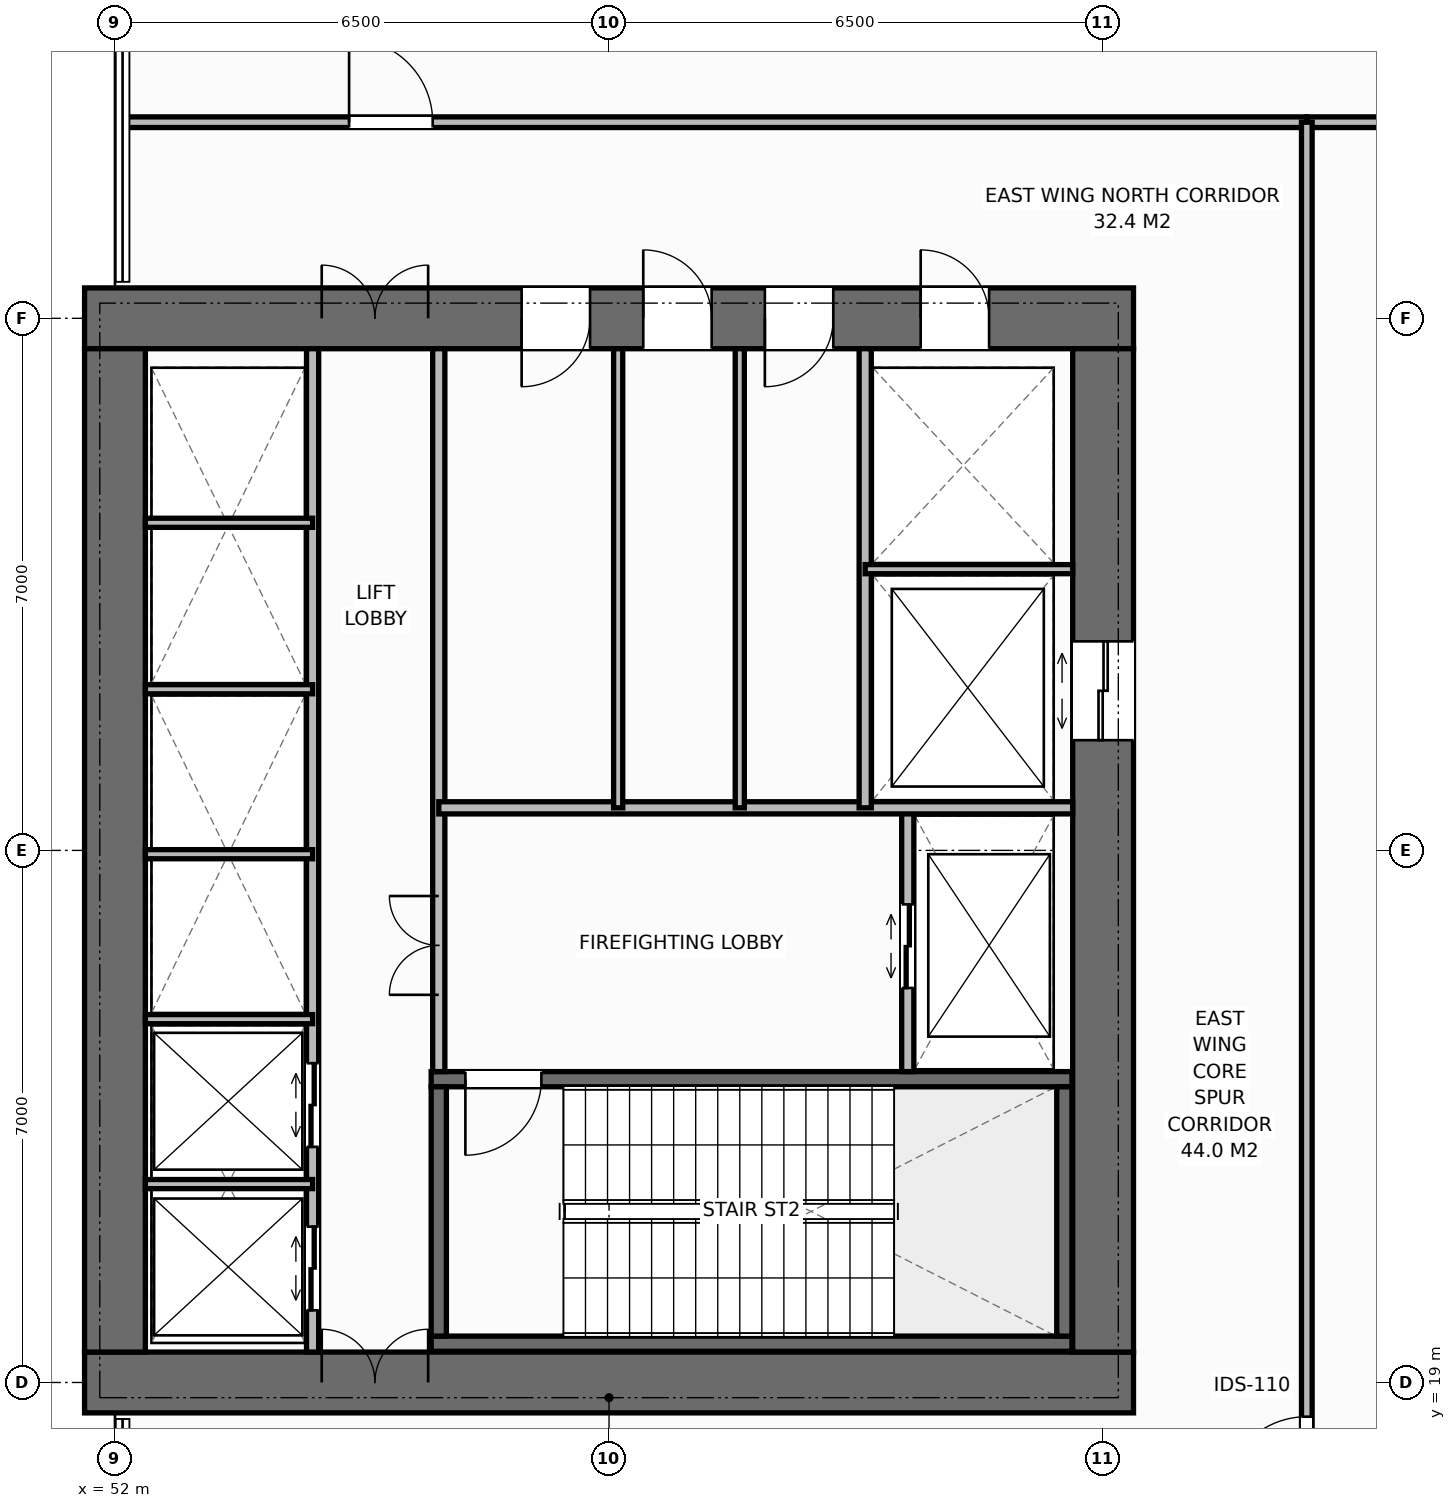
"""IFC4 building model, lengths in metres.
Left out: names, types, materials, properties, quantities, classifications, styles, units other than length and angle.
Written with IfcOpenShell. Run it as: python <this file> out.ifc"""

import sys

from ifc_helpers import new_model, si_unit, direction, frame, frame_2d, origin, place, context, subcontext, project, spatial, rectangle, extrude, element, fill, save


model = new_model("IFC4")
c1 = context("Model", 3, precision=1e-05, world=origin(), true_north=direction((0.0, 1.0)))
c2 = subcontext(c1, "Body", "Model", "MODEL_VIEW")
j1 = project(units=[si_unit("LENGTHUNIT", "METRE"), si_unit("PLANEANGLEUNIT", "RADIAN")], contexts=[c1])
p1 = place(None, origin())
s1 = spatial("IfcSite", under=j1, at=p1, CompositionType="ELEMENT")
p2 = place(p1, origin())
s2 = spatial("IfcBuilding", under=s1, at=p2, CompositionType="ELEMENT")
p3 = place(p2, frame((0.0, 0.0, 11.5)))
s3 = spatial("IfcBuildingStorey", under=s2, at=p3, CompositionType="ELEMENT", Elevation=11.5)
p4 = place(p3, frame((51.6, 19.0, 0.0), z_axis=(0.0, 0.0, 1.0), x_axis=(1.0, 0.0, 0.0)))
e1 = element("IfcWall", 1, at=p4, inside=s3, PredefinedType="SHEAR", context=c2, shape_type="SweptSolid", body=[
    extrude(rectangle(XDim=13.8, YDim=0.8, at=frame_2d((6.9, 0.0))), origin(), (0.0, 0.0, 1.0), 5.5),
])
p5 = place(p4, frame((3.12, 0.0, 0.0)))
e2 = element("IfcOpeningElement", 2, at=p5, cuts=e1, PredefinedType="OPENING", context=c2, shape_type="SweptSolid", body=[
    extrude(rectangle(XDim=1.4, YDim=2.2, at=frame_2d((0.7, 1.1))), frame((0.0, 0.41, 0.0), z_axis=(0.0, -1.0, 0.0), x_axis=(1.0, 0.0, 0.0)), (0.0, 0.0, 1.0), 0.82),
])
p6 = place(p3, frame((51.6, 33.0, 0.0), z_axis=(0.0, 0.0, 1.0), x_axis=(1.0, 0.0, 0.0)))
e3 = element("IfcWall", 3, at=p6, inside=s3, PredefinedType="SHEAR", context=c2, shape_type="SweptSolid", body=[
    extrude(rectangle(XDim=13.8, YDim=0.8, at=frame_2d((6.9, 0.0))), origin(), (0.0, 0.0, 1.0), 5.5),
])
p7 = place(p6, frame((3.12, 0.0, 0.0)))
e4 = element("IfcOpeningElement", 4, at=p7, cuts=e3, PredefinedType="OPENING", context=c2, shape_type="SweptSolid", body=[
    extrude(rectangle(XDim=1.4, YDim=2.2, at=frame_2d((0.7, 1.1))), frame((0.0, 0.41, 0.0), z_axis=(0.0, -1.0, 0.0), x_axis=(1.0, 0.0, 0.0)), (0.0, 0.0, 1.0), 0.82),
])
p8 = place(p6, frame((11.0, 0.0, 0.0)))
e5 = element("IfcOpeningElement", 5, at=p8, cuts=e3, PredefinedType="OPENING", context=c2, shape_type="SweptSolid", body=[
    extrude(rectangle(XDim=0.9, YDim=2.15, at=frame_2d((0.45, 1.075))), frame((0.0, 0.41, 0.0), z_axis=(0.0, -1.0, 0.0), x_axis=(1.0, 0.0, 0.0)), (0.0, 0.0, 1.0), 0.82),
])
p9 = place(p6, frame((5.75, 0.0, 0.0)))
e6 = element("IfcOpeningElement", 6, at=p9, cuts=e3, PredefinedType="OPENING", context=c2, shape_type="SweptSolid", body=[
    extrude(rectangle(XDim=0.9, YDim=2.15, at=frame_2d((0.45, 1.075))), frame((0.0, 0.41, 0.0), z_axis=(0.0, -1.0, 0.0), x_axis=(1.0, 0.0, 0.0)), (0.0, 0.0, 1.0), 0.82),
])
p10 = place(p6, frame((7.35, 0.0, 0.0)))
e7 = element("IfcOpeningElement", 7, at=p10, cuts=e3, PredefinedType="OPENING", context=c2, shape_type="SweptSolid", body=[
    extrude(rectangle(XDim=0.9, YDim=2.15, at=frame_2d((0.45, 1.075))), frame((0.0, 0.41, 0.0), z_axis=(0.0, -1.0, 0.0), x_axis=(1.0, 0.0, 0.0)), (0.0, 0.0, 1.0), 0.82),
])
p11 = place(p6, frame((8.95, 0.0, 0.0)))
e8 = element("IfcOpeningElement", 8, at=p11, cuts=e3, PredefinedType="OPENING", context=c2, shape_type="SweptSolid", body=[
    extrude(rectangle(XDim=0.9, YDim=2.15, at=frame_2d((0.45, 1.075))), frame((0.0, 0.41, 0.0), z_axis=(0.0, -1.0, 0.0), x_axis=(1.0, 0.0, 0.0)), (0.0, 0.0, 1.0), 0.82),
])
p12 = place(p3, frame((52.0, 19.4, 0.0), z_axis=(0.0, 0.0, 1.0), x_axis=(0.0, 1.0, 0.0)))
e9 = element("IfcWall", 9, at=p12, inside=s3, PredefinedType="SHEAR", context=c2, shape_type="SweptSolid", body=[
    extrude(rectangle(XDim=13.2, YDim=0.8, at=frame_2d((6.6, 0.0))), origin(), (0.0, 0.0, 1.0), 5.5),
])
p13 = place(p3, frame((65.0, 19.4, 0.0), z_axis=(0.0, 0.0, 1.0), x_axis=(0.0, 1.0, 0.0)))
e10 = element("IfcWall", 10, at=p13, inside=s3, PredefinedType="SHEAR", context=c2, shape_type="SweptSolid", body=[
    extrude(rectangle(XDim=13.2, YDim=0.8, at=frame_2d((6.6, 0.0))), origin(), (0.0, 0.0, 1.0), 5.5),
])
p14 = place(p13, frame((8.05, 0.0, 0.0)))
e11 = element("IfcOpeningElement", 11, at=p14, cuts=e10, PredefinedType="OPENING", context=c2, shape_type="SweptSolid", body=[
    extrude(rectangle(XDim=1.3, YDim=2.2, at=frame_2d((0.65, 1.1))), frame((0.0, 0.41, 0.0), z_axis=(0.0, -1.0, 0.0), x_axis=(1.0, 0.0, 0.0)), (0.0, 0.0, 1.0), 0.82),
])
p15 = place(p3, frame((56.16, 19.51, 0.0), z_axis=(0.0, 0.0, 1.0), x_axis=(1.0, 0.0, 0.0)))
e12 = element("IfcWall", 12, at=p15, inside=s3, PredefinedType="SHEAR", context=c2, shape_type="SweptSolid", body=[
    extrude(rectangle(XDim=8.43, YDim=0.2, at=frame_2d((4.215, 0.0))), origin(), (0.0, 0.0, 1.0), 5.5),
])
p16 = place(p3, frame((56.16, 22.99, 0.0), z_axis=(0.0, 0.0, 1.0), x_axis=(1.0, 0.0, 0.0)))
e13 = element("IfcWall", 13, at=p16, inside=s3, PredefinedType="SHEAR", context=c2, shape_type="SweptSolid", body=[
    extrude(rectangle(XDim=8.43, YDim=0.2, at=frame_2d((4.215, 0.0))), origin(), (0.0, 0.0, 1.0), 5.5),
])
p17 = place(p16, frame((0.45, 0.0, 0.0)))
e14 = element("IfcOpeningElement", 14, at=p17, cuts=e13, PredefinedType="OPENING", context=c2, shape_type="SweptSolid", body=[
    extrude(rectangle(XDim=1.0, YDim=2.15, at=frame_2d((0.5, 1.075))), frame((0.0, 0.11, 0.0), z_axis=(0.0, -1.0, 0.0), x_axis=(1.0, 0.0, 0.0)), (0.0, 0.0, 1.0), 0.22),
])
for number, where, z_axis, x_axis in (
    (15, (56.26, 19.61, 0.0), (0.0, 0.0, 1.0), (0.0, 1.0, 0.0)),
    (16, (64.49, 19.61, 0.0), (0.0, 0.0, 1.0), (0.0, 1.0, 0.0)),
):
    element("IfcWall", number, at=place(p3, frame(where, z_axis=z_axis, x_axis=x_axis)), inside=s3, PredefinedType="SHEAR", context=c2, shape_type="SweptSolid", body=[
        extrude(rectangle(XDim=3.28, YDim=0.2, at=frame_2d((1.64, 0.0))), origin(), (0.0, 0.0, 1.0), 5.5),
    ])
p18 = place(p3, frame((54.6, 19.4, 0.0), z_axis=(0.0, 0.0, 1.0), x_axis=(0.0, 1.0, 0.0)))
e17 = element("IfcWall", 17, at=p18, inside=s3, PredefinedType="STANDARD", context=c2, shape_type="SweptSolid", body=[
    extrude(rectangle(XDim=13.2, YDim=0.16, at=frame_2d((6.6, 0.0))), origin(), (0.0, 0.0, 1.0), 5.22),
])
p19 = place(p18, frame((0.55, 0.0, 0.0)))
e18 = element("IfcOpeningElement", 18, at=p19, cuts=e17, PredefinedType="OPENING", context=c2, shape_type="SweptSolid", body=[
    extrude(rectangle(XDim=1.1, YDim=2.2, at=frame_2d((0.55, 1.1))), frame((0.0, 0.09, 0.0), z_axis=(0.0, -1.0, 0.0), x_axis=(1.0, 0.0, 0.0)), (0.0, 0.0, 1.0), 0.18),
])
p20 = place(p18, frame((2.7, 0.0, 0.0)))
e19 = element("IfcOpeningElement", 19, at=p20, cuts=e17, PredefinedType="OPENING", context=c2, shape_type="SweptSolid", body=[
    extrude(rectangle(XDim=1.1, YDim=2.2, at=frame_2d((0.55, 1.1))), frame((0.0, 0.09, 0.0), z_axis=(0.0, -1.0, 0.0), x_axis=(1.0, 0.0, 0.0)), (0.0, 0.0, 1.0), 0.18),
])
p21 = place(p3, frame((56.26, 23.09, 0.0), z_axis=(0.0, 0.0, 1.0), x_axis=(0.0, 1.0, 0.0)))
e20 = element("IfcWall", 20, at=p21, inside=s3, PredefinedType="STANDARD", context=c2, shape_type="SweptSolid", body=[
    extrude(rectangle(XDim=9.51, YDim=0.16, at=frame_2d((4.755, 0.0))), origin(), (0.0, 0.0, 1.0), 5.22),
])
p22 = place(p21, frame((1.01, 0.0, 0.0)))
e21 = element("IfcOpeningElement", 21, at=p22, cuts=e20, PredefinedType="OPENING", context=c2, shape_type="SweptSolid", body=[
    extrude(rectangle(XDim=1.3, YDim=2.2, at=frame_2d((0.65, 1.1))), frame((0.0, 0.09, 0.0), z_axis=(0.0, -1.0, 0.0), x_axis=(1.0, 0.0, 0.0)), (0.0, 0.0, 1.0), 0.18),
])
for number, where, z_axis, x_axis in (
    (22, (52.4, 21.61, 0.0), (0.0, 0.0, 1.0), (1.0, 0.0, 0.0)),
    (23, (52.4, 23.78, 0.0), (0.0, 0.0, 1.0), (1.0, 0.0, 0.0)),
    (24, (52.4, 25.95, 0.0), (0.0, 0.0, 1.0), (1.0, 0.0, 0.0)),
    (25, (52.4, 28.12, 0.0), (0.0, 0.0, 1.0), (1.0, 0.0, 0.0)),
    (26, (52.4, 30.31, 0.0), (0.0, 0.0, 1.0), (1.0, 0.0, 0.0)),
):
    element("IfcWall", number, at=place(p3, frame(where, z_axis=z_axis, x_axis=x_axis)), inside=s3, PredefinedType="PARTITIONING", context=c2, shape_type="SweptSolid", body=[
        extrude(rectangle(XDim=2.2, YDim=0.12, at=frame_2d((1.1, 0.0))), origin(), (0.0, 0.0, 1.0), 5.22),
    ])
p23 = place(p3, frame((62.43, 23.09, 0.0), z_axis=(0.0, 0.0, 1.0), x_axis=(0.0, 1.0, 0.0)))
e27 = element("IfcWall", 27, at=p23, inside=s3, PredefinedType="STANDARD", context=c2, shape_type="SweptSolid", body=[
    extrude(rectangle(XDim=3.47, YDim=0.16, at=frame_2d((1.735, 0.0))), origin(), (0.0, 0.0, 1.0), 5.22),
])
p24 = place(p23, frame((1.1, 0.0, 0.0)))
e28 = element("IfcOpeningElement", 28, at=p24, cuts=e27, PredefinedType="OPENING", context=c2, shape_type="SweptSolid", body=[
    extrude(rectangle(XDim=1.1, YDim=2.2, at=frame_2d((0.55, 1.1))), frame((0.0, 0.09, 0.0), z_axis=(0.0, -1.0, 0.0), x_axis=(1.0, 0.0, 0.0)), (0.0, 0.0, 1.0), 0.18),
])
p25 = place(p3, frame((56.26, 26.56, 0.0), z_axis=(0.0, 0.0, 1.0), x_axis=(1.0, 0.0, 0.0)))
e29 = element("IfcWall", 29, at=p25, inside=s3, PredefinedType="STANDARD", context=c2, shape_type="SweptSolid", body=[
    extrude(rectangle(XDim=8.34, YDim=0.16, at=frame_2d((4.17, 0.0))), origin(), (0.0, 0.0, 1.0), 5.22),
])
p26 = place(p3, frame((61.87, 26.56, 0.0), z_axis=(0.0, 0.0, 1.0), x_axis=(0.0, 1.0, 0.0)))
e30 = element("IfcWall", 30, at=p26, inside=s3, PredefinedType="STANDARD", context=c2, shape_type="SweptSolid", body=[
    extrude(rectangle(XDim=6.04, YDim=0.16, at=frame_2d((3.02, 0.0))), origin(), (0.0, 0.0, 1.0), 5.22),
])
p27 = place(p3, frame((61.87, 29.7, 0.0), z_axis=(0.0, 0.0, 1.0), x_axis=(1.0, 0.0, 0.0)))
e31 = element("IfcWall", 31, at=p27, inside=s3, PredefinedType="PARTITIONING", context=c2, shape_type="SweptSolid", body=[
    extrude(rectangle(XDim=2.73, YDim=0.12, at=frame_2d((1.365, 0.0))), origin(), (0.0, 0.0, 1.0), 5.22),
])
for number, where, z_axis, x_axis in (
    (32, (58.62, 26.56, 0.0), (0.0, 0.0, 1.0), (0.0, 1.0, 0.0)),
    (33, (60.22, 26.56, 0.0), (0.0, 0.0, 1.0), (0.0, 1.0, 0.0)),
):
    element("IfcWall", number, at=place(p3, frame(where, z_axis=z_axis, x_axis=x_axis)), inside=s3, PredefinedType="PARTITIONING", context=c2, shape_type="SweptSolid", body=[
        extrude(rectangle(XDim=6.04, YDim=0.12, at=frame_2d((3.02, 0.0))), origin(), (0.0, 0.0, 1.0), 5.22),
    ])
p28 = place(p3, frame((67.68, 35.58, 0.0), z_axis=(0.0, 0.0, 1.0), x_axis=(1.0, 0.0, 0.0)))
e34 = element("IfcWall", 34, at=p28, inside=s3, PredefinedType="PARTITIONING", context=c2, shape_type="SweptSolid", body=[
    extrude(rectangle(XDim=10.32, YDim=0.14, at=frame_2d((5.16, 0.0))), origin(), (0.0, 0.0, 1.0), 5.22),
])
p29 = place(p3, frame((52.08, 35.58, 0.0), z_axis=(0.0, 0.0, 1.0), x_axis=(1.0, 0.0, 0.0)))
e35 = element("IfcWall", 35, at=p29, inside=s3, PredefinedType="PARTITIONING", context=c2, shape_type="SweptSolid", body=[
    extrude(rectangle(XDim=15.6, YDim=0.14, at=frame_2d((7.8, 0.0))), origin(), (0.0, 0.0, 1.0), 5.22),
])
p30 = place(p29, frame((3.0, 0.0, 0.0)))
e36 = element("IfcOpeningElement", 36, at=p30, cuts=e35, PredefinedType="OPENING", context=c2, shape_type="SweptSolid", body=[
    extrude(rectangle(XDim=1.1, YDim=2.15, at=frame_2d((0.55, 1.075))), frame((0.0, 0.08, 0.0), z_axis=(0.0, -1.0, 0.0), x_axis=(1.0, 0.0, 0.0)), (0.0, 0.0, 1.0), 0.16),
])
p31 = place(p3, frame((67.68, 12.45, 0.0), z_axis=(0.0, 0.0, 1.0), x_axis=(0.0, 1.0, 0.0)))
e37 = element("IfcWall", 37, at=p31, inside=s3, PredefinedType="PARTITIONING", context=c2, shape_type="SweptSolid", body=[
    extrude(rectangle(XDim=23.13, YDim=0.14, at=frame_2d((11.565, 0.0))), origin(), (0.0, 0.0, 1.0), 5.22),
])
p32 = place(p31, frame((5.0, 0.0, 0.0)))
e38 = element("IfcOpeningElement", 38, at=p32, cuts=e37, PredefinedType="OPENING", context=c2, shape_type="SweptSolid", body=[
    extrude(rectangle(XDim=1.1, YDim=2.15, at=frame_2d((0.55, 1.075))), frame((0.0, 0.08, 0.0), z_axis=(0.0, -1.0, 0.0), x_axis=(1.0, 0.0, 0.0)), (0.0, 0.0, 1.0), 0.16),
])
p33 = place(p5, origin())
e39 = element("IfcDoor", 39, at=p33, inside=s3, OperationType="DOUBLE_DOOR_SINGLE_SWING", PredefinedType="DOOR", context=c2, shape_type="SweptSolid", body=[
    extrude(rectangle(XDim=1.4, YDim=2.2, at=frame_2d((0.7, 1.1))), frame((0.0, 0.125, 0.0), z_axis=(0.0, -1.0, 0.0), x_axis=(1.0, 0.0, 0.0)), (0.0, 0.0, 1.0), 0.05),
])
fill(e2, e39)
p34 = place(p7, origin())
e40 = element("IfcDoor", 40, at=p34, inside=s3, OperationType="DOUBLE_DOOR_SINGLE_SWING", PredefinedType="DOOR", context=c2, shape_type="SweptSolid", body=[
    extrude(rectangle(XDim=1.4, YDim=2.2, at=frame_2d((0.7, 1.1))), frame((0.0, -0.075, 0.0), z_axis=(0.0, -1.0, 0.0), x_axis=(1.0, 0.0, 0.0)), (0.0, 0.0, 1.0), 0.05),
])
fill(e4, e40)
p35 = place(p19, origin())
e41 = element("IfcDoor", 41, at=p35, inside=s3, OperationType="DOUBLE_DOOR_SLIDING", PredefinedType="DOOR", context=c2, shape_type="SweptSolid", body=[
    extrude(rectangle(XDim=1.1, YDim=2.2, at=frame_2d((0.55, 1.1))), frame((0.0, 0.025, 0.0), z_axis=(0.0, -1.0, 0.0), x_axis=(1.0, 0.0, 0.0)), (0.0, 0.0, 1.0), 0.05),
])
fill(e18, e41)
p36 = place(p20, origin())
e42 = element("IfcDoor", 42, at=p36, inside=s3, OperationType="DOUBLE_DOOR_SLIDING", PredefinedType="DOOR", context=c2, shape_type="SweptSolid", body=[
    extrude(rectangle(XDim=1.1, YDim=2.2, at=frame_2d((0.55, 1.1))), frame((0.0, 0.025, 0.0), z_axis=(0.0, -1.0, 0.0), x_axis=(1.0, 0.0, 0.0)), (0.0, 0.0, 1.0), 0.05),
])
fill(e19, e42)
p37 = place(p17, origin())
e43 = element("IfcDoor", 43, at=p37, inside=s3, OperationType="SINGLE_SWING_RIGHT", PredefinedType="DOOR", context=c2, shape_type="SweptSolid", body=[
    extrude(rectangle(XDim=1.0, YDim=2.15, at=frame_2d((0.5, 1.075))), frame((0.0, 0.025, 0.0), z_axis=(0.0, -1.0, 0.0), x_axis=(1.0, 0.0, 0.0)), (0.0, 0.0, 1.0), 0.05),
])
fill(e14, e43)
p38 = place(p24, origin())
e44 = element("IfcDoor", 44, at=p38, inside=s3, OperationType="DOUBLE_DOOR_SLIDING", PredefinedType="DOOR", context=c2, shape_type="SweptSolid", body=[
    extrude(rectangle(XDim=1.1, YDim=2.2, at=frame_2d((0.55, 1.1))), frame((0.0, 0.025, 0.0), z_axis=(0.0, -1.0, 0.0), x_axis=(1.0, 0.0, 0.0)), (0.0, 0.0, 1.0), 0.05),
])
fill(e28, e44)
p39 = place(p22, origin())
e45 = element("IfcDoor", 45, at=p39, inside=s3, OperationType="DOUBLE_DOOR_SINGLE_SWING", PredefinedType="DOOR", context=c2, shape_type="SweptSolid", body=[
    extrude(rectangle(XDim=1.3, YDim=2.2, at=frame_2d((0.65, 1.1))), frame((0.0, 0.025, 0.0), z_axis=(0.0, -1.0, 0.0), x_axis=(1.0, 0.0, 0.0)), (0.0, 0.0, 1.0), 0.05),
])
fill(e21, e45)
p40 = place(p14, origin())
e46 = element("IfcDoor", 46, at=p40, inside=s3, OperationType="DOUBLE_DOOR_SLIDING", PredefinedType="DOOR", context=c2, shape_type="SweptSolid", body=[
    extrude(rectangle(XDim=1.3, YDim=2.2, at=frame_2d((0.65, 1.1))), frame((0.0, 0.025, 0.0), z_axis=(0.0, -1.0, 0.0), x_axis=(1.0, 0.0, 0.0)), (0.0, 0.0, 1.0), 0.05),
])
fill(e11, e46)
p41 = place(p8, origin())
e47 = element("IfcDoor", 47, at=p41, inside=s3, OperationType="SINGLE_SWING_LEFT", PredefinedType="DOOR", context=c2, shape_type="SweptSolid", body=[
    extrude(rectangle(XDim=0.9, YDim=2.15, at=frame_2d((0.45, 1.075))), frame((0.0, -0.075, 0.0), z_axis=(0.0, -1.0, 0.0), x_axis=(1.0, 0.0, 0.0)), (0.0, 0.0, 1.0), 0.05),
])
fill(e5, e47)
p42 = place(p9, origin())
e48 = element("IfcDoor", 48, at=p42, inside=s3, OperationType="SINGLE_SWING_RIGHT", PredefinedType="DOOR", context=c2, shape_type="SweptSolid", body=[
    extrude(rectangle(XDim=0.9, YDim=2.15, at=frame_2d((0.45, 1.075))), frame((0.0, -0.075, 0.0), z_axis=(0.0, -1.0, 0.0), x_axis=(1.0, 0.0, 0.0)), (0.0, 0.0, 1.0), 0.05),
])
fill(e6, e48)
p43 = place(p10, origin())
e49 = element("IfcDoor", 49, at=p43, inside=s3, OperationType="SINGLE_SWING_LEFT", PredefinedType="DOOR", context=c2, shape_type="SweptSolid", body=[
    extrude(rectangle(XDim=0.9, YDim=2.15, at=frame_2d((0.45, 1.075))), frame((0.0, -0.075, 0.0), z_axis=(0.0, -1.0, 0.0), x_axis=(1.0, 0.0, 0.0)), (0.0, 0.0, 1.0), 0.05),
])
fill(e7, e49)
p44 = place(p11, origin())
e50 = element("IfcDoor", 50, at=p44, inside=s3, OperationType="SINGLE_SWING_RIGHT", PredefinedType="DOOR", context=c2, shape_type="SweptSolid", body=[
    extrude(rectangle(XDim=0.9, YDim=2.15, at=frame_2d((0.45, 1.075))), frame((0.0, -0.075, 0.0), z_axis=(0.0, -1.0, 0.0), x_axis=(1.0, 0.0, 0.0)), (0.0, 0.0, 1.0), 0.05),
])
fill(e8, e50)
p45 = place(p30, origin())
e51 = element("IfcDoor", 51, at=p45, inside=s3, OperationType="SINGLE_SWING_LEFT", PredefinedType="DOOR", context=c2, shape_type="SweptSolid", body=[
    extrude(rectangle(XDim=1.1, YDim=2.15, at=frame_2d((0.55, 1.075))), frame((0.0, 0.025, 0.0), z_axis=(0.0, -1.0, 0.0), x_axis=(1.0, 0.0, 0.0)), (0.0, 0.0, 1.0), 0.05),
])
fill(e36, e51)
p46 = place(p32, origin())
e52 = element("IfcDoor", 52, at=p46, inside=s3, OperationType="SINGLE_SWING_LEFT", PredefinedType="DOOR", context=c2, shape_type="SweptSolid", body=[
    extrude(rectangle(XDim=1.1, YDim=2.15, at=frame_2d((0.55, 1.075))), frame((0.0, 0.025, 0.0), z_axis=(0.0, -1.0, 0.0), x_axis=(1.0, 0.0, 0.0)), (0.0, 0.0, 1.0), 0.05),
])
fill(e38, e52)
save(model, sys.argv[1])
